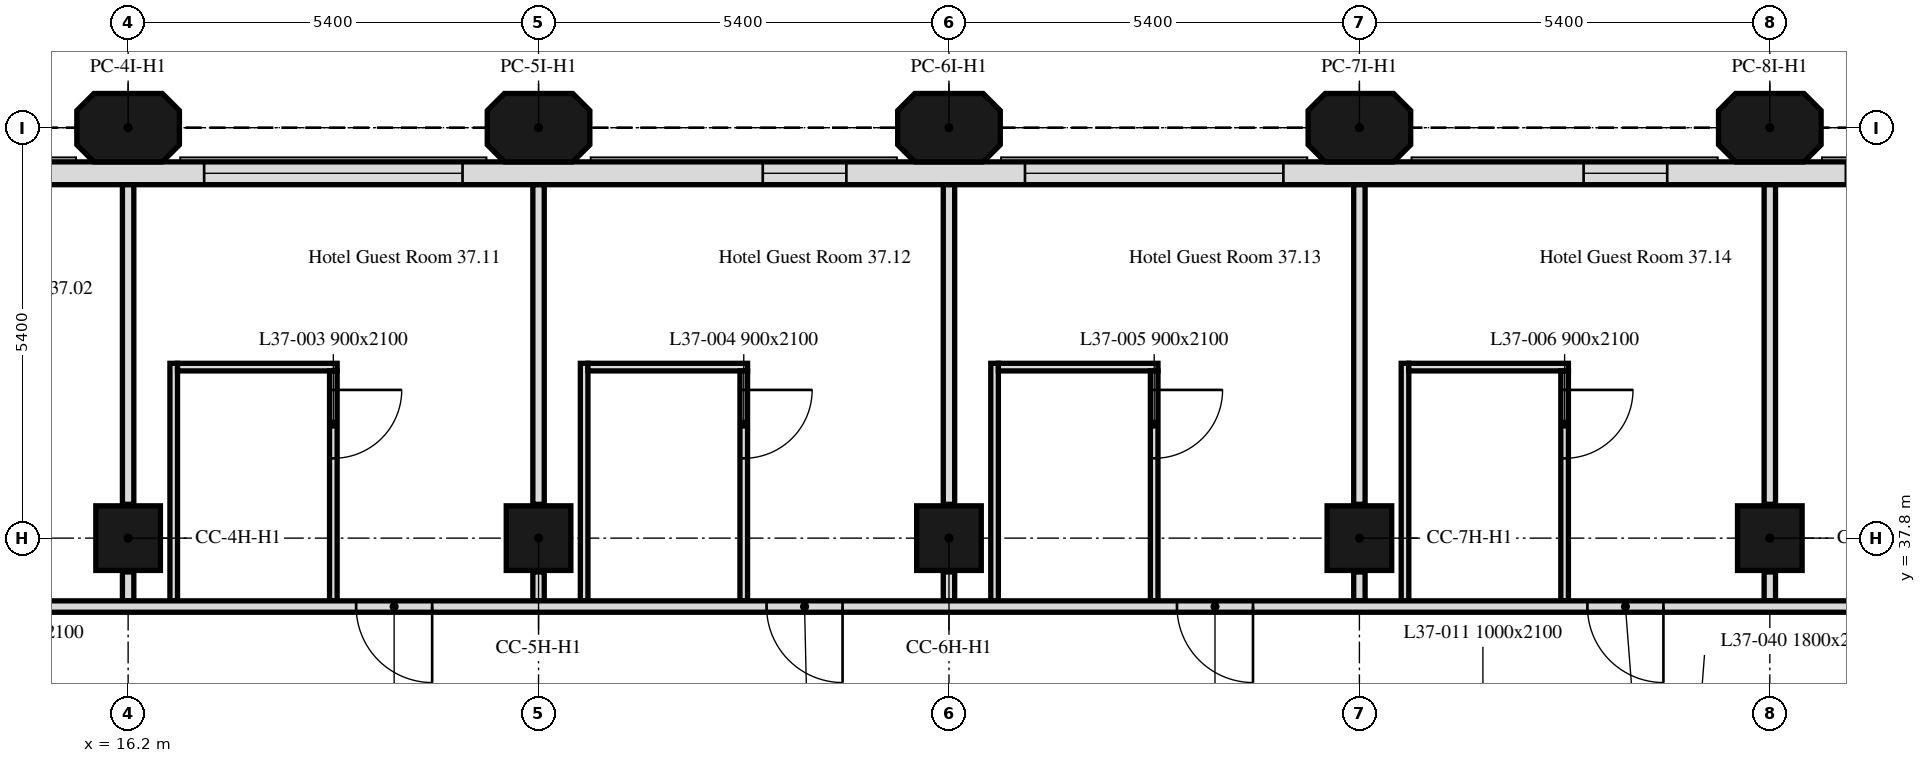
"""IFC4 building model, lengths in metres.
Left out: names, types, materials, properties, quantities, classifications, styles, units other than length and angle.
Written with IfcOpenShell. Run it as: python <this file> out.ifc"""

import sys

from ifc_helpers import new_model, si_unit, direction, frame, frame_2d, origin, origin_2d, place, context, subcontext, project, spatial, polyline, rectangle, outline, extrude, element, fill, save


model = new_model("IFC4")
c1 = context("Model", 3, precision=1e-05, world=origin(), true_north=direction((0.0, 1.0)))
c2 = subcontext(c1, "Body", "Model", "MODEL_VIEW")
j1 = project(units=[si_unit("LENGTHUNIT", "METRE"), si_unit("PLANEANGLEUNIT", "RADIAN")], contexts=[c1])
p1 = place(None, origin())
s1 = spatial("IfcSite", under=j1, at=p1, CompositionType="ELEMENT")
p2 = place(p1, origin())
s2 = spatial("IfcBuilding", under=s1, at=p2, CompositionType="ELEMENT")
p3 = place(p2, frame((0.0, 0.0, 159.4)))
s3 = spatial("IfcBuildingStorey", under=s2, at=p3, CompositionType="ELEMENT", Elevation=159.4)
for number, where, z_axis, x_axis in (
    (1, (16.2, 37.8, 0.0), (0.0, 0.0, 1.0), (1.0, 0.0, 0.0)),
    (2, (21.6, 37.8, 0.0), (0.0, 0.0, 1.0), (1.0, 0.0, 0.0)),
    (3, (27.0, 37.8, 0.0), (0.0, 0.0, 1.0), (1.0, 0.0, 0.0)),
    (4, (32.4, 37.8, 0.0), (0.0, 0.0, 1.0), (1.0, 0.0, 0.0)),
    (5, (37.8, 37.8, 0.0), (0.0, 0.0, 1.0), (1.0, 0.0, 0.0)),
):
    element("IfcColumn", number, at=place(p3, frame(where, z_axis=z_axis, x_axis=x_axis)), inside=s3, PredefinedType="COLUMN", context=c2, shape_type="SweptSolid", body=[
        extrude(rectangle(XDim=0.85, YDim=0.85, at=origin_2d()), origin(), (0.0, 0.0, 1.0), 3.0),
    ])
for number, where, z_axis, x_axis in (
    (6, (16.2, 43.2, 0.0), (0.0, 0.0, 1.0), (1.0, 0.0, 0.0)),
    (7, (21.6, 43.2, 0.0), (0.0, 0.0, 1.0), (1.0, 0.0, 0.0)),
    (8, (27.0, 43.2, 0.0), (0.0, 0.0, 1.0), (1.0, 0.0, 0.0)),
    (9, (32.4, 43.2, 0.0), (0.0, 0.0, 1.0), (1.0, 0.0, 0.0)),
    (10, (37.8, 43.2, 0.0), (0.0, 0.0, 1.0), (1.0, 0.0, 0.0)),
):
    element("IfcColumn", number, at=place(p3, frame(where, z_axis=z_axis, x_axis=x_axis)), inside=s3, PredefinedType="COLUMN", context=c2, shape_type="SweptSolid", body=[
        extrude(outline(polyline([(-0.45, -0.45), (0.45, -0.45), (0.675, -0.225), (0.675, 0.225), (0.45, 0.45), (-0.45, 0.45), (-0.675, 0.225), (-0.675, -0.225), (-0.45, -0.45)])), origin(), (0.0, 0.0, 1.0), 3.0),
    ])
p4 = place(p3, frame((43.014, 42.6, 0.0), z_axis=(0.0, 0.0, 1.0), x_axis=(-1.0, 0.0, 0.0)))
e11 = element("IfcWall", 11, at=p4, inside=s3, PredefinedType="SOLIDWALL", context=c2, shape_type="SweptSolid", body=[
    extrude(rectangle(XDim=32.027, YDim=0.3, at=frame_2d((16.014, 0.0))), origin(), (0.0, 0.0, 1.0), 3.0),
])
p5 = place(p4, frame((0.814, 0.0, 0.9)))
e12 = element("IfcOpeningElement", 12, at=p5, cuts=e11, PredefinedType="OPENING", context=c2, shape_type="SweptSolid", body=[
    extrude(rectangle(XDim=3.4, YDim=1.7, at=frame_2d((1.7, 0.85))), frame((0.0, 0.16, 0.0), z_axis=(0.0, -1.0, 0.0), x_axis=(1.0, 0.0, 0.0)), (0.0, 0.0, 1.0), 0.32),
])
p6 = place(p4, frame((6.564, 0.0, 0.9)))
e13 = element("IfcOpeningElement", 13, at=p6, cuts=e11, PredefinedType="OPENING", context=c2, shape_type="SweptSolid", body=[
    extrude(rectangle(XDim=1.1, YDim=1.7, at=frame_2d((0.55, 0.85))), frame((0.0, 0.16, 0.0), z_axis=(0.0, -1.0, 0.0), x_axis=(1.0, 0.0, 0.0)), (0.0, 0.0, 1.0), 0.32),
])
p7 = place(p4, frame((11.614, 0.0, 0.9)))
e14 = element("IfcOpeningElement", 14, at=p7, cuts=e11, PredefinedType="OPENING", context=c2, shape_type="SweptSolid", body=[
    extrude(rectangle(XDim=3.4, YDim=1.7, at=frame_2d((1.7, 0.85))), frame((0.0, 0.16, 0.0), z_axis=(0.0, -1.0, 0.0), x_axis=(1.0, 0.0, 0.0)), (0.0, 0.0, 1.0), 0.32),
])
p8 = place(p4, frame((17.364, 0.0, 0.9)))
e15 = element("IfcOpeningElement", 15, at=p8, cuts=e11, PredefinedType="OPENING", context=c2, shape_type="SweptSolid", body=[
    extrude(rectangle(XDim=1.1, YDim=1.7, at=frame_2d((0.55, 0.85))), frame((0.0, 0.16, 0.0), z_axis=(0.0, -1.0, 0.0), x_axis=(1.0, 0.0, 0.0)), (0.0, 0.0, 1.0), 0.32),
])
p9 = place(p4, frame((22.414, 0.0, 0.9)))
e16 = element("IfcOpeningElement", 16, at=p9, cuts=e11, PredefinedType="OPENING", context=c2, shape_type="SweptSolid", body=[
    extrude(rectangle(XDim=3.4, YDim=1.7, at=frame_2d((1.7, 0.85))), frame((0.0, 0.16, 0.0), z_axis=(0.0, -1.0, 0.0), x_axis=(1.0, 0.0, 0.0)), (0.0, 0.0, 1.0), 0.32),
])
p10 = place(p4, frame((28.164, 0.0, 0.9)))
e17 = element("IfcOpeningElement", 17, at=p10, cuts=e11, PredefinedType="OPENING", context=c2, shape_type="SweptSolid", body=[
    extrude(rectangle(XDim=1.1, YDim=1.7, at=frame_2d((0.55, 0.85))), frame((0.0, 0.16, 0.0), z_axis=(0.0, -1.0, 0.0), x_axis=(1.0, 0.0, 0.0)), (0.0, 0.0, 1.0), 0.32),
])
p11 = place(p3, frame((16.2, 36.975, 0.0), z_axis=(0.0, 0.0, 1.0), x_axis=(0.0, 1.0, 0.0)))
e18 = element("IfcWall", 18, at=p11, inside=s3, PredefinedType="PARTITIONING", context=c2, shape_type="SweptSolid", body=[
    extrude(rectangle(XDim=0.38, YDim=0.15, at=frame_2d((0.19, 0.0))), origin(), (0.0, 0.0, 1.0), 3.0),
])
p12 = place(p3, frame((16.2, 38.245, 0.0), z_axis=(0.0, 0.0, 1.0), x_axis=(0.0, 1.0, 0.0)))
e19 = element("IfcWall", 19, at=p12, inside=s3, PredefinedType="PARTITIONING", context=c2, shape_type="SweptSolid", body=[
    extrude(rectangle(XDim=4.204, YDim=0.15, at=frame_2d((2.102, 0.0))), origin(), (0.0, 0.0, 1.0), 3.0),
])
p13 = place(p3, frame((16.8, 36.975, 0.0), z_axis=(0.0, 0.0, 1.0), x_axis=(0.0, 1.0, 0.0)))
e20 = element("IfcWall", 20, at=p13, inside=s3, PredefinedType="PARTITIONING", context=c2, shape_type="SweptSolid", body=[
    extrude(rectangle(XDim=3.125, YDim=0.1, at=frame_2d((1.562, 0.0))), origin(), (0.0, 0.0, 1.0), 3.0),
])
p14 = place(p3, frame((16.85, 40.05, 0.0), z_axis=(0.0, 0.0, 1.0), x_axis=(1.0, 0.0, 0.0)))
e21 = element("IfcWall", 21, at=p14, inside=s3, PredefinedType="PARTITIONING", context=c2, shape_type="SweptSolid", body=[
    extrude(rectangle(XDim=2.1, YDim=0.1, at=frame_2d((1.05, 0.0))), origin(), (0.0, 0.0, 1.0), 3.0),
])
p15 = place(p3, frame((18.9, 40.0, 0.0), z_axis=(0.0, 0.0, 1.0), x_axis=(0.0, -1.0, 0.0)))
e22 = element("IfcWall", 22, at=p15, inside=s3, PredefinedType="PARTITIONING", context=c2, shape_type="SweptSolid", body=[
    extrude(rectangle(XDim=3.025, YDim=0.1, at=frame_2d((1.512, 0.0))), origin(), (0.0, 0.0, 1.0), 3.0),
])
p16 = place(p15, frame((0.25, 0.0, 0.0)))
e23 = element("IfcOpeningElement", 23, at=p16, cuts=e22, PredefinedType="OPENING", context=c2, shape_type="SweptSolid", body=[
    extrude(rectangle(XDim=0.9, YDim=2.1, at=frame_2d((0.45, 1.05))), frame((0.0, 0.05, 0.0), z_axis=(0.0, -1.0, 0.0), x_axis=(1.0, 0.0, 0.0)), (0.0, 0.0, 1.0), 0.1),
])
p17 = place(p3, frame((21.6, 36.975, 0.0), z_axis=(0.0, 0.0, 1.0), x_axis=(0.0, 1.0, 0.0)))
e24 = element("IfcWall", 24, at=p17, inside=s3, PredefinedType="PARTITIONING", context=c2, shape_type="SweptSolid", body=[
    extrude(rectangle(XDim=0.38, YDim=0.15, at=frame_2d((0.19, 0.0))), origin(), (0.0, 0.0, 1.0), 3.0),
])
p18 = place(p3, frame((21.6, 38.245, 0.0), z_axis=(0.0, 0.0, 1.0), x_axis=(0.0, 1.0, 0.0)))
e25 = element("IfcWall", 25, at=p18, inside=s3, PredefinedType="PARTITIONING", context=c2, shape_type="SweptSolid", body=[
    extrude(rectangle(XDim=4.204, YDim=0.15, at=frame_2d((2.102, 0.0))), origin(), (0.0, 0.0, 1.0), 3.0),
])
p19 = place(p3, frame((22.2, 36.975, 0.0), z_axis=(0.0, 0.0, 1.0), x_axis=(0.0, 1.0, 0.0)))
e26 = element("IfcWall", 26, at=p19, inside=s3, PredefinedType="PARTITIONING", context=c2, shape_type="SweptSolid", body=[
    extrude(rectangle(XDim=3.125, YDim=0.1, at=frame_2d((1.562, 0.0))), origin(), (0.0, 0.0, 1.0), 3.0),
])
p20 = place(p3, frame((22.25, 40.05, 0.0), z_axis=(0.0, 0.0, 1.0), x_axis=(1.0, 0.0, 0.0)))
e27 = element("IfcWall", 27, at=p20, inside=s3, PredefinedType="PARTITIONING", context=c2, shape_type="SweptSolid", body=[
    extrude(rectangle(XDim=2.1, YDim=0.1, at=frame_2d((1.05, 0.0))), origin(), (0.0, 0.0, 1.0), 3.0),
])
p21 = place(p3, frame((24.3, 40.0, 0.0), z_axis=(0.0, 0.0, 1.0), x_axis=(0.0, -1.0, 0.0)))
e28 = element("IfcWall", 28, at=p21, inside=s3, PredefinedType="PARTITIONING", context=c2, shape_type="SweptSolid", body=[
    extrude(rectangle(XDim=3.025, YDim=0.1, at=frame_2d((1.512, 0.0))), origin(), (0.0, 0.0, 1.0), 3.0),
])
p22 = place(p21, frame((0.25, 0.0, 0.0)))
e29 = element("IfcOpeningElement", 29, at=p22, cuts=e28, PredefinedType="OPENING", context=c2, shape_type="SweptSolid", body=[
    extrude(rectangle(XDim=0.9, YDim=2.1, at=frame_2d((0.45, 1.05))), frame((0.0, 0.05, 0.0), z_axis=(0.0, -1.0, 0.0), x_axis=(1.0, 0.0, 0.0)), (0.0, 0.0, 1.0), 0.1),
])
p23 = place(p3, frame((27.0, 36.975, 0.0), z_axis=(0.0, 0.0, 1.0), x_axis=(0.0, 1.0, 0.0)))
e30 = element("IfcWall", 30, at=p23, inside=s3, PredefinedType="PARTITIONING", context=c2, shape_type="SweptSolid", body=[
    extrude(rectangle(XDim=0.38, YDim=0.15, at=frame_2d((0.19, 0.0))), origin(), (0.0, 0.0, 1.0), 3.0),
])
p24 = place(p3, frame((27.0, 38.245, 0.0), z_axis=(0.0, 0.0, 1.0), x_axis=(0.0, 1.0, 0.0)))
e31 = element("IfcWall", 31, at=p24, inside=s3, PredefinedType="PARTITIONING", context=c2, shape_type="SweptSolid", body=[
    extrude(rectangle(XDim=4.204, YDim=0.15, at=frame_2d((2.102, 0.0))), origin(), (0.0, 0.0, 1.0), 3.0),
])
p25 = place(p3, frame((27.6, 36.975, 0.0), z_axis=(0.0, 0.0, 1.0), x_axis=(0.0, 1.0, 0.0)))
e32 = element("IfcWall", 32, at=p25, inside=s3, PredefinedType="PARTITIONING", context=c2, shape_type="SweptSolid", body=[
    extrude(rectangle(XDim=3.125, YDim=0.1, at=frame_2d((1.562, 0.0))), origin(), (0.0, 0.0, 1.0), 3.0),
])
p26 = place(p3, frame((27.65, 40.05, 0.0), z_axis=(0.0, 0.0, 1.0), x_axis=(1.0, 0.0, 0.0)))
e33 = element("IfcWall", 33, at=p26, inside=s3, PredefinedType="PARTITIONING", context=c2, shape_type="SweptSolid", body=[
    extrude(rectangle(XDim=2.1, YDim=0.1, at=frame_2d((1.05, 0.0))), origin(), (0.0, 0.0, 1.0), 3.0),
])
p27 = place(p3, frame((29.7, 40.0, 0.0), z_axis=(0.0, 0.0, 1.0), x_axis=(0.0, -1.0, 0.0)))
e34 = element("IfcWall", 34, at=p27, inside=s3, PredefinedType="PARTITIONING", context=c2, shape_type="SweptSolid", body=[
    extrude(rectangle(XDim=3.025, YDim=0.1, at=frame_2d((1.512, 0.0))), origin(), (0.0, 0.0, 1.0), 3.0),
])
p28 = place(p27, frame((0.25, 0.0, 0.0)))
e35 = element("IfcOpeningElement", 35, at=p28, cuts=e34, PredefinedType="OPENING", context=c2, shape_type="SweptSolid", body=[
    extrude(rectangle(XDim=0.9, YDim=2.1, at=frame_2d((0.45, 1.05))), frame((0.0, 0.05, 0.0), z_axis=(0.0, -1.0, 0.0), x_axis=(1.0, 0.0, 0.0)), (0.0, 0.0, 1.0), 0.1),
])
p29 = place(p3, frame((32.4, 36.975, 0.0), z_axis=(0.0, 0.0, 1.0), x_axis=(0.0, 1.0, 0.0)))
e36 = element("IfcWall", 36, at=p29, inside=s3, PredefinedType="PARTITIONING", context=c2, shape_type="SweptSolid", body=[
    extrude(rectangle(XDim=0.38, YDim=0.15, at=frame_2d((0.19, 0.0))), origin(), (0.0, 0.0, 1.0), 3.0),
])
p30 = place(p3, frame((32.4, 38.245, 0.0), z_axis=(0.0, 0.0, 1.0), x_axis=(0.0, 1.0, 0.0)))
e37 = element("IfcWall", 37, at=p30, inside=s3, PredefinedType="PARTITIONING", context=c2, shape_type="SweptSolid", body=[
    extrude(rectangle(XDim=4.204, YDim=0.15, at=frame_2d((2.102, 0.0))), origin(), (0.0, 0.0, 1.0), 3.0),
])
p31 = place(p3, frame((33.0, 36.975, 0.0), z_axis=(0.0, 0.0, 1.0), x_axis=(0.0, 1.0, 0.0)))
e38 = element("IfcWall", 38, at=p31, inside=s3, PredefinedType="PARTITIONING", context=c2, shape_type="SweptSolid", body=[
    extrude(rectangle(XDim=3.125, YDim=0.1, at=frame_2d((1.562, 0.0))), origin(), (0.0, 0.0, 1.0), 3.0),
])
p32 = place(p3, frame((33.05, 40.05, 0.0), z_axis=(0.0, 0.0, 1.0), x_axis=(1.0, 0.0, 0.0)))
e39 = element("IfcWall", 39, at=p32, inside=s3, PredefinedType="PARTITIONING", context=c2, shape_type="SweptSolid", body=[
    extrude(rectangle(XDim=2.1, YDim=0.1, at=frame_2d((1.05, 0.0))), origin(), (0.0, 0.0, 1.0), 3.0),
])
p33 = place(p3, frame((35.1, 40.0, 0.0), z_axis=(0.0, 0.0, 1.0), x_axis=(0.0, -1.0, 0.0)))
e40 = element("IfcWall", 40, at=p33, inside=s3, PredefinedType="PARTITIONING", context=c2, shape_type="SweptSolid", body=[
    extrude(rectangle(XDim=3.025, YDim=0.1, at=frame_2d((1.512, 0.0))), origin(), (0.0, 0.0, 1.0), 3.0),
])
p34 = place(p33, frame((0.25, 0.0, 0.0)))
e41 = element("IfcOpeningElement", 41, at=p34, cuts=e40, PredefinedType="OPENING", context=c2, shape_type="SweptSolid", body=[
    extrude(rectangle(XDim=0.9, YDim=2.1, at=frame_2d((0.45, 1.05))), frame((0.0, 0.05, 0.0), z_axis=(0.0, -1.0, 0.0), x_axis=(1.0, 0.0, 0.0)), (0.0, 0.0, 1.0), 0.1),
])
p35 = place(p3, frame((37.8, 36.975, 0.0), z_axis=(0.0, 0.0, 1.0), x_axis=(0.0, 1.0, 0.0)))
e42 = element("IfcWall", 42, at=p35, inside=s3, PredefinedType="PARTITIONING", context=c2, shape_type="SweptSolid", body=[
    extrude(rectangle(XDim=0.38, YDim=0.15, at=frame_2d((0.19, 0.0))), origin(), (0.0, 0.0, 1.0), 3.0),
])
p36 = place(p3, frame((37.8, 38.245, 0.0), z_axis=(0.0, 0.0, 1.0), x_axis=(0.0, 1.0, 0.0)))
e43 = element("IfcWall", 43, at=p36, inside=s3, PredefinedType="PARTITIONING", context=c2, shape_type="SweptSolid", body=[
    extrude(rectangle(XDim=4.204, YDim=0.15, at=frame_2d((2.102, 0.0))), origin(), (0.0, 0.0, 1.0), 3.0),
])
p37 = place(p3, frame((47.849, 36.9, 0.0), z_axis=(0.0, 0.0, 1.0), x_axis=(-1.0, 0.0, 0.0)))
e44 = element("IfcWall", 44, at=p37, inside=s3, PredefinedType="PARTITIONING", context=c2, shape_type="SweptSolid", body=[
    extrude(rectangle(XDim=41.698, YDim=0.15, at=frame_2d((20.849, 0.0))), origin(), (0.0, 0.0, 1.0), 3.0),
])
p38 = place(p37, frame((39.249, 0.0, 0.0)))
e45 = element("IfcOpeningElement", 45, at=p38, cuts=e44, PredefinedType="OPENING", context=c2, shape_type="SweptSolid", body=[
    extrude(rectangle(XDim=1.0, YDim=2.1, at=frame_2d((0.5, 1.05))), frame((0.0, 0.075, 0.0), z_axis=(0.0, -1.0, 0.0), x_axis=(1.0, 0.0, 0.0)), (0.0, 0.0, 1.0), 0.15),
])
p39 = place(p37, frame((27.649, 0.0, 0.0)))
e46 = element("IfcOpeningElement", 46, at=p39, cuts=e44, PredefinedType="OPENING", context=c2, shape_type="SweptSolid", body=[
    extrude(rectangle(XDim=1.0, YDim=2.1, at=frame_2d((0.5, 1.05))), frame((0.0, 0.075, 0.0), z_axis=(0.0, -1.0, 0.0), x_axis=(1.0, 0.0, 0.0)), (0.0, 0.0, 1.0), 0.15),
])
p40 = place(p37, frame((22.249, 0.0, 0.0)))
e47 = element("IfcOpeningElement", 47, at=p40, cuts=e44, PredefinedType="OPENING", context=c2, shape_type="SweptSolid", body=[
    extrude(rectangle(XDim=1.0, YDim=2.1, at=frame_2d((0.5, 1.05))), frame((0.0, 0.075, 0.0), z_axis=(0.0, -1.0, 0.0), x_axis=(1.0, 0.0, 0.0)), (0.0, 0.0, 1.0), 0.15),
])
p41 = place(p37, frame((16.849, 0.0, 0.0)))
e48 = element("IfcOpeningElement", 48, at=p41, cuts=e44, PredefinedType="OPENING", context=c2, shape_type="SweptSolid", body=[
    extrude(rectangle(XDim=1.0, YDim=2.1, at=frame_2d((0.5, 1.05))), frame((0.0, 0.075, 0.0), z_axis=(0.0, -1.0, 0.0), x_axis=(1.0, 0.0, 0.0)), (0.0, 0.0, 1.0), 0.15),
])
p42 = place(p37, frame((11.449, 0.0, 0.0)))
e49 = element("IfcOpeningElement", 49, at=p42, cuts=e44, PredefinedType="OPENING", context=c2, shape_type="SweptSolid", body=[
    extrude(rectangle(XDim=1.0, YDim=2.1, at=frame_2d((0.5, 1.05))), frame((0.0, 0.075, 0.0), z_axis=(0.0, -1.0, 0.0), x_axis=(1.0, 0.0, 0.0)), (0.0, 0.0, 1.0), 0.15),
])
p43 = place(p37, frame((2.744, 0.0, 0.0)))
e50 = element("IfcOpeningElement", 50, at=p43, cuts=e44, PredefinedType="OPENING", context=c2, shape_type="SweptSolid", body=[
    extrude(rectangle(XDim=1.0, YDim=2.1, at=frame_2d((0.5, 1.05))), frame((0.0, 0.075, 0.0), z_axis=(0.0, -1.0, 0.0), x_axis=(1.0, 0.0, 0.0)), (0.0, 0.0, 1.0), 0.15),
])
p44 = place(p6, origin())
e51 = element("IfcWindow", 51, at=p44, inside=s3, PartitioningType="SINGLE_PANEL", PredefinedType="WINDOW", context=c2, shape_type="SweptSolid", body=[
    extrude(rectangle(XDim=1.1, YDim=1.7, at=frame_2d((0.55, 0.85))), frame((0.0, 0.03, 0.0), z_axis=(0.0, -1.0, 0.0), x_axis=(1.0, 0.0, 0.0)), (0.0, 0.0, 1.0), 0.06),
])
fill(e13, e51)
p45 = place(p7, origin())
e52 = element("IfcWindow", 52, at=p45, inside=s3, PartitioningType="SINGLE_PANEL", PredefinedType="WINDOW", context=c2, shape_type="SweptSolid", body=[
    extrude(rectangle(XDim=3.4, YDim=1.7, at=frame_2d((1.7, 0.85))), frame((0.0, 0.03, 0.0), z_axis=(0.0, -1.0, 0.0), x_axis=(1.0, 0.0, 0.0)), (0.0, 0.0, 1.0), 0.06),
])
fill(e14, e52)
p46 = place(p8, origin())
e53 = element("IfcWindow", 53, at=p46, inside=s3, PartitioningType="SINGLE_PANEL", PredefinedType="WINDOW", context=c2, shape_type="SweptSolid", body=[
    extrude(rectangle(XDim=1.1, YDim=1.7, at=frame_2d((0.55, 0.85))), frame((0.0, 0.03, 0.0), z_axis=(0.0, -1.0, 0.0), x_axis=(1.0, 0.0, 0.0)), (0.0, 0.0, 1.0), 0.06),
])
fill(e15, e53)
p47 = place(p9, origin())
e54 = element("IfcWindow", 54, at=p47, inside=s3, PartitioningType="SINGLE_PANEL", PredefinedType="WINDOW", context=c2, shape_type="SweptSolid", body=[
    extrude(rectangle(XDim=3.4, YDim=1.7, at=frame_2d((1.7, 0.85))), frame((0.0, 0.03, 0.0), z_axis=(0.0, -1.0, 0.0), x_axis=(1.0, 0.0, 0.0)), (0.0, 0.0, 1.0), 0.06),
])
fill(e16, e54)
p48 = place(p16, origin())
e55 = element("IfcDoor", 55, at=p48, inside=s3, OperationType="SINGLE_SWING_LEFT", PredefinedType="DOOR", context=c2, shape_type="SweptSolid", body=[
    extrude(rectangle(XDim=0.9, YDim=2.1, at=frame_2d((0.45, 1.05))), frame((0.0, 0.025, 0.0), z_axis=(0.0, -1.0, 0.0), x_axis=(1.0, 0.0, 0.0)), (0.0, 0.0, 1.0), 0.05),
])
fill(e23, e55)
p49 = place(p22, origin())
e56 = element("IfcDoor", 56, at=p49, inside=s3, OperationType="SINGLE_SWING_RIGHT", PredefinedType="DOOR", context=c2, shape_type="SweptSolid", body=[
    extrude(rectangle(XDim=0.9, YDim=2.1, at=frame_2d((0.45, 1.05))), frame((0.0, 0.025, 0.0), z_axis=(0.0, -1.0, 0.0), x_axis=(1.0, 0.0, 0.0)), (0.0, 0.0, 1.0), 0.05),
])
fill(e29, e56)
p50 = place(p28, origin())
e57 = element("IfcDoor", 57, at=p50, inside=s3, OperationType="SINGLE_SWING_RIGHT", PredefinedType="DOOR", context=c2, shape_type="SweptSolid", body=[
    extrude(rectangle(XDim=0.9, YDim=2.1, at=frame_2d((0.45, 1.05))), frame((0.0, 0.025, 0.0), z_axis=(0.0, -1.0, 0.0), x_axis=(1.0, 0.0, 0.0)), (0.0, 0.0, 1.0), 0.05),
])
fill(e35, e57)
p51 = place(p34, origin())
e58 = element("IfcDoor", 58, at=p51, inside=s3, OperationType="SINGLE_SWING_LEFT", PredefinedType="DOOR", context=c2, shape_type="SweptSolid", body=[
    extrude(rectangle(XDim=0.9, YDim=2.1, at=frame_2d((0.45, 1.05))), frame((0.0, 0.025, 0.0), z_axis=(0.0, -1.0, 0.0), x_axis=(1.0, 0.0, 0.0)), (0.0, 0.0, 1.0), 0.05),
])
fill(e41, e58)
p52 = place(p39, origin())
e59 = element("IfcDoor", 59, at=p52, inside=s3, OperationType="SINGLE_SWING_RIGHT", PredefinedType="DOOR", context=c2, shape_type="SweptSolid", body=[
    extrude(rectangle(XDim=1.0, YDim=2.1, at=frame_2d((0.5, 1.05))), frame((0.0, 0.025, 0.0), z_axis=(0.0, -1.0, 0.0), x_axis=(1.0, 0.0, 0.0)), (0.0, 0.0, 1.0), 0.05),
])
fill(e46, e59)
p53 = place(p40, origin())
e60 = element("IfcDoor", 60, at=p53, inside=s3, OperationType="SINGLE_SWING_RIGHT", PredefinedType="DOOR", context=c2, shape_type="SweptSolid", body=[
    extrude(rectangle(XDim=1.0, YDim=2.1, at=frame_2d((0.5, 1.05))), frame((0.0, 0.025, 0.0), z_axis=(0.0, -1.0, 0.0), x_axis=(1.0, 0.0, 0.0)), (0.0, 0.0, 1.0), 0.05),
])
fill(e47, e60)
p54 = place(p41, origin())
e61 = element("IfcDoor", 61, at=p54, inside=s3, OperationType="SINGLE_SWING_LEFT", PredefinedType="DOOR", context=c2, shape_type="SweptSolid", body=[
    extrude(rectangle(XDim=1.0, YDim=2.1, at=frame_2d((0.5, 1.05))), frame((0.0, 0.025, 0.0), z_axis=(0.0, -1.0, 0.0), x_axis=(1.0, 0.0, 0.0)), (0.0, 0.0, 1.0), 0.05),
])
fill(e48, e61)
p55 = place(p42, origin())
e62 = element("IfcDoor", 62, at=p55, inside=s3, OperationType="SINGLE_SWING_LEFT", PredefinedType="DOOR", context=c2, shape_type="SweptSolid", body=[
    extrude(rectangle(XDim=1.0, YDim=2.1, at=frame_2d((0.5, 1.05))), frame((0.0, 0.025, 0.0), z_axis=(0.0, -1.0, 0.0), x_axis=(1.0, 0.0, 0.0)), (0.0, 0.0, 1.0), 0.05),
])
fill(e49, e62)
save(model, sys.argv[1])
